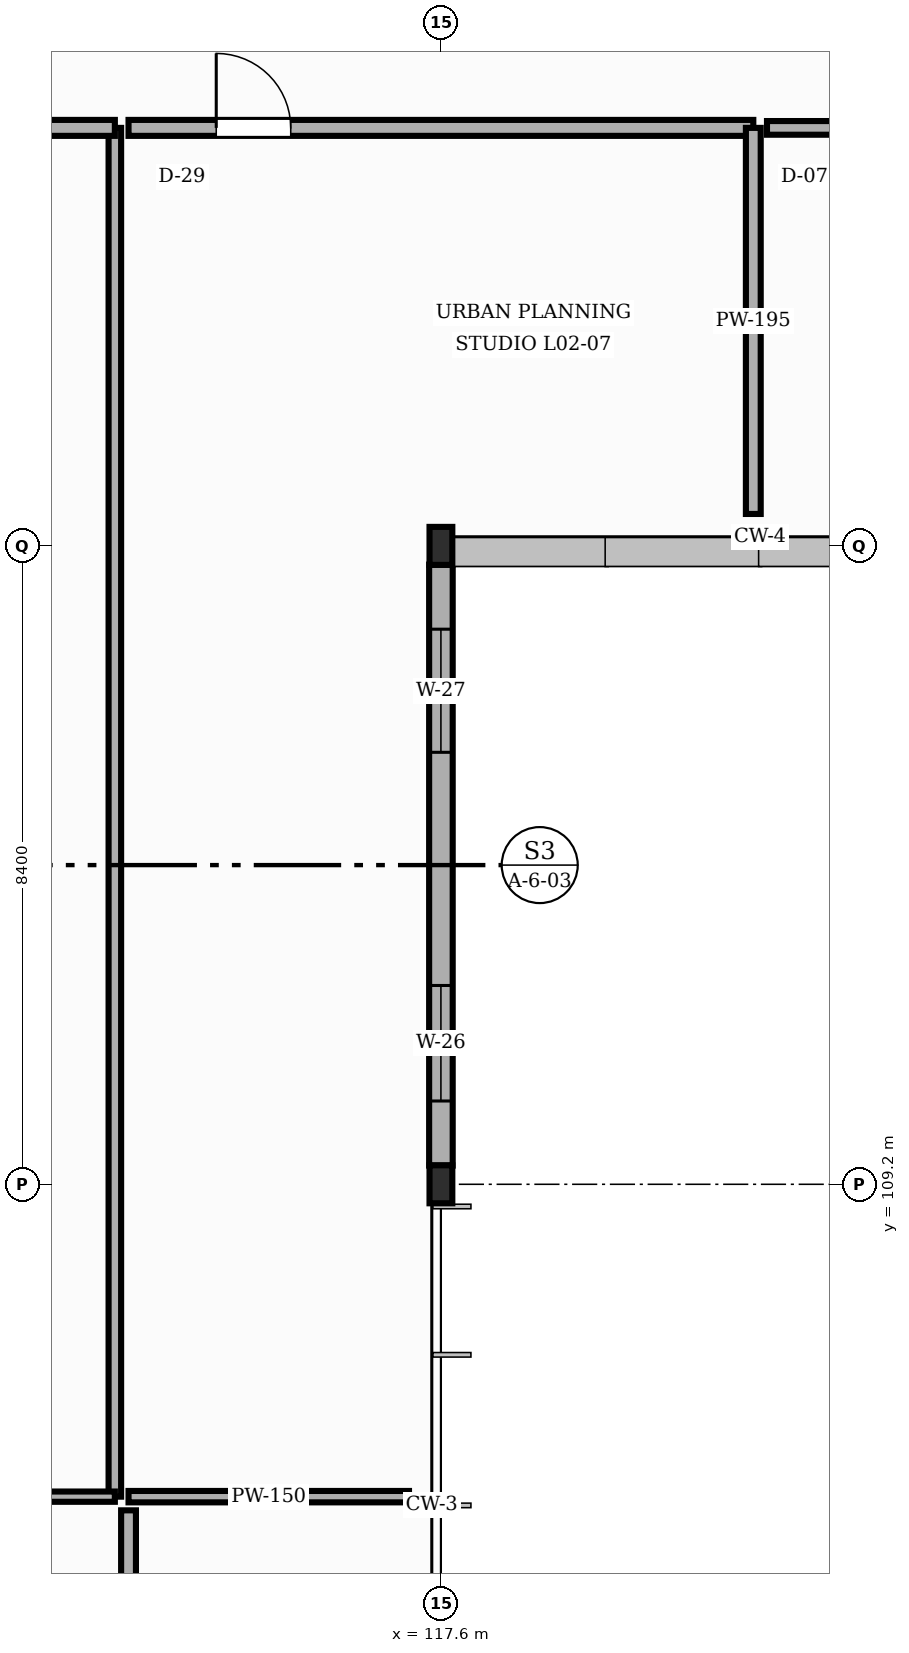
"""IFC4 building model, lengths in metres.
Left out: names, types, materials, properties, quantities, classifications, styles, units other than length and angle.
Written with IfcOpenShell. Run it as: python <this file> out.ifc"""

import sys

from ifc_helpers import new_model, si_unit, direction, frame, frame_2d, origin, origin_2d, place, context, subcontext, project, spatial, rectangle, i_section, extrude, element, fill, save


model = new_model("IFC4")
c1 = context("Model", 3, precision=1e-05, world=origin(), true_north=direction((0.0, 1.0)))
c2 = subcontext(c1, "Body", "Model", "MODEL_VIEW")
j1 = project(units=[si_unit("LENGTHUNIT", "METRE"), si_unit("PLANEANGLEUNIT", "RADIAN")], contexts=[c1])
p1 = place(None, origin())
s1 = spatial("IfcSite", under=j1, at=p1, CompositionType="ELEMENT")
p2 = place(p1, origin())
s2 = spatial("IfcBuilding", under=s1, at=p2, CompositionType="ELEMENT")
p3 = place(p2, frame((0.0, 0.0, 9.9)))
s3 = spatial("IfcBuildingStorey", under=s2, at=p3, CompositionType="ELEMENT", Elevation=9.9)
for number, where, z_axis, x_axis in (
    (1, (117.6, 109.2, 0.0), (0.0, 0.0, 1.0), (1.0, 0.0, 0.0)),
    (2, (117.6, 117.6, 0.0), (0.0, 0.0, 1.0), (1.0, 0.0, 0.0)),
):
    element("IfcColumn", number, at=place(p3, frame(where, z_axis=z_axis, x_axis=x_axis)), inside=s3, PredefinedType="COLUMN", context=c2, shape_type="SweptSolid", body=[
        extrude(i_section(OverallWidth=0.3, OverallDepth=0.5, WebThickness=0.014, FlangeThickness=0.028, FilletRadius=0.027, at=origin_2d()), origin(), (0.0, 0.0, 1.0), 4.05),
    ])
p4 = place(p3, frame((117.6, 109.446, 0.0), z_axis=(0.0, 0.0, 1.0), x_axis=(0.0, 1.0, 0.0)))
e3 = element("IfcWall", 3, at=p4, inside=s3, PredefinedType="STANDARD", context=c2, shape_type="SweptSolid", body=[
    extrude(rectangle(XDim=7.908, YDim=0.31, at=frame_2d((3.954, 0.0))), origin(), (0.0, 0.0, 1.0), 3.562),
])
p5 = place(p4, frame((0.85, 0.0, 0.9)))
e4 = element("IfcOpeningElement", 4, at=p5, cuts=e3, PredefinedType="OPENING", context=c2, shape_type="SweptSolid", body=[
    extrude(rectangle(XDim=1.52, YDim=1.45, at=frame_2d((0.76, 0.725))), frame((0.0, 0.165, 0.0), z_axis=(0.0, -1.0, 0.0), x_axis=(1.0, 0.0, 0.0)), (0.0, 0.0, 1.0), 0.33),
])
p6 = place(p4, frame((5.438, 0.0, 0.9)))
e5 = element("IfcOpeningElement", 5, at=p6, cuts=e3, PredefinedType="OPENING", context=c2, shape_type="SweptSolid", body=[
    extrude(rectangle(XDim=1.62, YDim=1.45, at=frame_2d((0.81, 0.725))), frame((0.0, 0.165, 0.0), z_axis=(0.0, -1.0, 0.0), x_axis=(1.0, 0.0, 0.0)), (0.0, 0.0, 1.0), 0.33),
])
p7 = place(p3, frame((113.31, 123.1, -0.004), z_axis=(0.0, 0.0, 1.0), x_axis=(0.0, -1.0, 0.0)))
e6 = element("IfcWall", 6, at=p7, inside=s3, PredefinedType="STANDARD", context=c2, shape_type="SweptSolid", body=[
    extrude(rectangle(XDim=18.01, YDim=0.165, at=frame_2d((9.005, 0.0))), origin(), (0.0, 0.0, 1.0), 3.844),
])
p8 = place(p3, frame((113.31, 105.09, -0.004), z_axis=(0.0, 0.0, 1.0), x_axis=(-1.0, 0.0, 0.0)))
e7 = element("IfcWall", 7, at=p8, inside=s3, PredefinedType="STANDARD", context=c2, shape_type="SweptSolid", body=[
    extrude(rectangle(XDim=8.05, YDim=0.135, at=frame_2d((4.025, 0.0))), origin(), (0.0, 0.0, 1.0), 3.844),
])
p9 = place(p3, frame((105.26, 123.1, -0.004), z_axis=(0.0, 0.0, 1.0), x_axis=(1.0, 0.0, 0.0)))
e8 = element("IfcWall", 8, at=p9, inside=s3, PredefinedType="STANDARD", context=c2, shape_type="SweptSolid", body=[
    extrude(rectangle(XDim=8.05, YDim=0.21, at=frame_2d((4.025, 0.0))), origin(), (0.0, 0.0, 1.0), 3.844),
])
p10 = place(p3, frame((117.18, 105.09, -0.004), z_axis=(0.0, 0.0, 1.0), x_axis=(-1.0, 0.0, 0.0)))
e9 = element("IfcWall", 9, at=p10, inside=s3, PredefinedType="STANDARD", context=c2, shape_type="SweptSolid", body=[
    extrude(rectangle(XDim=3.69, YDim=0.15, at=frame_2d((1.845, 0.0))), origin(), (0.0, 0.0, 1.0), 3.844),
])
p11 = place(p3, frame((113.49, 123.1, -0.004), z_axis=(0.0, 0.0, 1.0), x_axis=(1.0, 0.0, 0.0)))
e10 = element("IfcWall", 10, at=p11, inside=s3, PredefinedType="STANDARD", context=c2, shape_type="SweptSolid", body=[
    extrude(rectangle(XDim=8.22, YDim=0.21, at=frame_2d((4.11, 0.0))), origin(), (0.0, 0.0, 1.0), 3.844),
])
p12 = place(p11, frame((1.154, 0.0, 0.0)))
e11 = element("IfcOpeningElement", 11, at=p12, cuts=e10, PredefinedType="OPENING", context=c2, shape_type="SweptSolid", body=[
    extrude(rectangle(XDim=0.98, YDim=2.3, at=frame_2d((0.49, 1.15))), frame((0.0, 0.115, 0.0), z_axis=(0.0, -1.0, 0.0), x_axis=(1.0, 0.0, 0.0)), (0.0, 0.0, 1.0), 0.23),
])
p13 = place(p3, frame((121.71, 123.1, -0.004), z_axis=(0.0, 0.0, 1.0), x_axis=(0.0, -1.0, 0.0)))
e12 = element("IfcWall", 12, at=p13, inside=s3, PredefinedType="STANDARD", context=c2, shape_type="SweptSolid", body=[
    extrude(rectangle(XDim=5.08, YDim=0.195, at=frame_2d((2.54, 0.0))), origin(), (0.0, 0.0, 1.0), 3.844),
])
p14 = place(p3, frame((113.49, 100.18, -0.004), z_axis=(0.0, 0.0, 1.0), x_axis=(0.0, 1.0, 0.0)))
e13 = element("IfcWall", 13, at=p14, inside=s3, PredefinedType="STANDARD", context=c2, shape_type="SweptSolid", body=[
    extrude(rectangle(XDim=4.73, YDim=0.195, at=frame_2d((2.365, 0.0))), origin(), (0.0, 0.0, 1.0), 3.844),
])
p15 = place(p3, frame((121.89, 123.1, -0.004), z_axis=(0.0, 0.0, 1.0), x_axis=(1.0, 0.0, 0.0)))
e14 = element("IfcWall", 14, at=p15, inside=s3, PredefinedType="STANDARD", context=c2, shape_type="SweptSolid", body=[
    extrude(rectangle(XDim=8.22, YDim=0.18, at=frame_2d((4.11, 0.0))), origin(), (0.0, 0.0, 1.0), 3.844),
])
p16 = place(p15, frame((0.944, 0.0, 0.0)))
e15 = element("IfcOpeningElement", 15, at=p16, cuts=e14, PredefinedType="OPENING", context=c2, shape_type="SweptSolid", body=[
    extrude(rectangle(XDim=1.4, YDim=2.06, at=frame_2d((0.7, 1.03))), frame((0.0, 0.1, 0.0), z_axis=(0.0, -1.0, 0.0), x_axis=(1.0, 0.0, 0.0)), (0.0, 0.0, 1.0), 0.2),
])
p17 = place(p5, origin())
e16 = element("IfcWindow", 16, at=p17, inside=s3, PartitioningType="SINGLE_PANEL", PredefinedType="WINDOW", context=c2, shape_type="SweptSolid", body=[
    extrude(rectangle(XDim=1.52, YDim=1.45, at=frame_2d((0.76, 0.725))), frame((0.0, 0.03, 0.0), z_axis=(0.0, -1.0, 0.0), x_axis=(1.0, 0.0, 0.0)), (0.0, 0.0, 1.0), 0.06),
])
fill(e4, e16)
p18 = place(p6, origin())
e17 = element("IfcWindow", 17, at=p18, inside=s3, PartitioningType="SINGLE_PANEL", PredefinedType="WINDOW", context=c2, shape_type="SweptSolid", body=[
    extrude(rectangle(XDim=1.62, YDim=1.45, at=frame_2d((0.81, 0.725))), frame((0.0, 0.03, 0.0), z_axis=(0.0, -1.0, 0.0), x_axis=(1.0, 0.0, 0.0)), (0.0, 0.0, 1.0), 0.06),
])
fill(e5, e17)
p19 = place(p12, origin())
e18 = element("IfcDoor", 18, at=p19, inside=s3, OperationType="SINGLE_SWING_LEFT", PredefinedType="DOOR", context=c2, shape_type="SweptSolid", body=[
    extrude(rectangle(XDim=0.98, YDim=2.3, at=frame_2d((0.49, 1.15))), frame((0.0, 0.025, 0.0), z_axis=(0.0, -1.0, 0.0), x_axis=(1.0, 0.0, 0.0)), (0.0, 0.0, 1.0), 0.05),
])
fill(e11, e18)
save(model, sys.argv[1])
